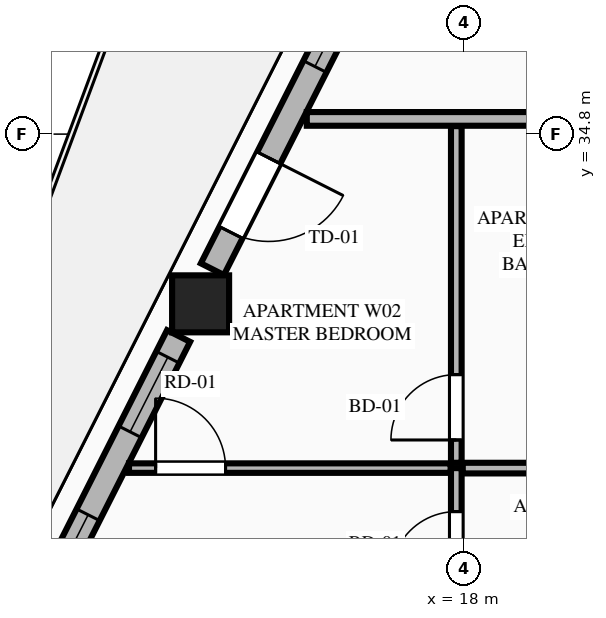
"""IFC4 building model, lengths in metres.
Left out: names, types, materials, properties, quantities, classifications, styles, units other than length and angle.
Written with IfcOpenShell. Run it as: python <this file> out.ifc"""

import sys

from ifc_helpers import new_model, si_unit, direction, frame, frame_2d, origin, origin_2d, place, context, subcontext, project, spatial, rectangle, extrude, element, fill, save


model = new_model("IFC4")
c1 = context("Model", 3, precision=1e-05, world=origin(), true_north=direction((0.0, 1.0)))
c2 = subcontext(c1, "Body", "Model", "MODEL_VIEW")
j1 = project(units=[si_unit("LENGTHUNIT", "METRE"), si_unit("PLANEANGLEUNIT", "RADIAN")], contexts=[c1])
p1 = place(None, origin())
s1 = spatial("IfcSite", under=j1, at=p1, CompositionType="ELEMENT")
p2 = place(p1, origin())
s2 = spatial("IfcBuilding", under=s1, at=p2, CompositionType="ELEMENT")
p3 = place(p2, frame((0.0, 0.0, 256.2)))
s3 = spatial("IfcBuildingStorey", under=s2, at=p3, CompositionType="ELEMENT", Elevation=256.2)
p4 = place(p3, frame((14.536, 32.567, 0.0), z_axis=(0.0, 0.0, 1.0), x_axis=(1.0, 0.0, 0.0)))
e1 = element("IfcColumn", 1, at=p4, inside=s3, PredefinedType="COLUMN", context=c2, shape_type="SweptSolid", body=[
    extrude(rectangle(XDim=0.75, YDim=0.75, at=origin_2d()), origin(), (0.0, 0.0, 1.0), 3.65),
])
p5 = place(p3, frame((16.768, 37.127, 0.0), z_axis=(0.0, 0.0, 1.0), x_axis=(-0.451581819983, -0.892229712496, 0.0)))
e2 = element("IfcWall", 2, at=p5, inside=s3, PredefinedType="STANDARD", context=c2, shape_type="SweptSolid", body=[
    extrude(rectangle(XDim=4.6, YDim=0.34, at=frame_2d((2.3, 0.0))), origin(), (0.0, 0.0, 1.0), 2.983),
])
p6 = place(p5, frame((2.958, 0.0, 0.0)))
e3 = element("IfcOpeningElement", 3, at=p6, cuts=e2, PredefinedType="OPENING", context=c2, shape_type="SweptSolid", body=[
    extrude(rectangle(XDim=1.1, YDim=2.25, at=frame_2d((0.55, 1.125))), frame((0.0, 0.18, 0.0), z_axis=(0.0, -1.0, 0.0), x_axis=(1.0, 0.0, 0.0)), (0.0, 0.0, 1.0), 0.36),
])
p7 = place(p5, frame((0.512, 0.0, 0.75)))
e4 = element("IfcOpeningElement", 4, at=p7, cuts=e2, PredefinedType="OPENING", context=c2, shape_type="SweptSolid", body=[
    extrude(rectangle(XDim=1.1, YDim=2.0, at=frame_2d((0.55, 1.0))), frame((0.0, 0.18, 0.0), z_axis=(0.0, -1.0, 0.0), x_axis=(1.0, 0.0, 0.0)), (0.0, 0.0, 1.0), 0.36),
])
p8 = place(p3, frame((14.246, 32.144, 0.0), z_axis=(0.0, 0.0, 1.0), x_axis=(-0.451285866323, -0.892379441077, 0.0)))
e5 = element("IfcWall", 5, at=p8, inside=s3, PredefinedType="STANDARD", context=c2, shape_type="SweptSolid", body=[
    extrude(rectangle(XDim=4.407, YDim=0.34, at=frame_2d((2.204, 0.0))), origin(), (0.0, 0.0, 1.0), 2.983),
])
p9 = place(p8, frame((0.313, 0.0, 0.75)))
e6 = element("IfcOpeningElement", 6, at=p9, cuts=e5, PredefinedType="OPENING", context=c2, shape_type="SweptSolid", body=[
    extrude(rectangle(XDim=1.1, YDim=2.0, at=frame_2d((0.55, 1.0))), frame((0.0, 0.18, 0.0), z_axis=(0.0, -1.0, 0.0), x_axis=(1.0, 0.0, 0.0)), (0.0, 0.0, 1.0), 0.36),
])
p10 = place(p8, frame((2.636, 0.0, 0.75)))
e7 = element("IfcOpeningElement", 7, at=p10, cuts=e5, PredefinedType="OPENING", context=c2, shape_type="SweptSolid", body=[
    extrude(rectangle(XDim=1.1, YDim=2.0, at=frame_2d((0.55, 1.0))), frame((0.0, 0.18, 0.0), z_axis=(0.0, -1.0, 0.0), x_axis=(1.0, 0.0, 0.0)), (0.0, 0.0, 1.0), 0.36),
])
p11 = place(p3, frame((15.933, 35.0, 0.0), z_axis=(0.0, 0.0, 1.0), x_axis=(1.0, 0.0, 0.0)))
e8 = element("IfcWall", 8, at=p11, inside=s3, PredefinedType="PARTITIONING", context=c2, shape_type="SweptSolid", body=[
    extrude(rectangle(XDim=4.322, YDim=0.18, at=frame_2d((2.161, 0.0))), origin(), (0.0, 0.0, 1.0), 3.45),
])
p12 = place(p3, frame((17.9, 27.006, 0.0), z_axis=(0.0, 0.0, 1.0), x_axis=(0.0, 1.0, 0.0)))
e9 = element("IfcWall", 9, at=p12, inside=s3, PredefinedType="PLUMBINGWALL", context=c2, shape_type="SweptSolid", body=[
    extrude(rectangle(XDim=3.4, YDim=0.14, at=frame_2d((1.7, 0.0))), origin(), (0.0, 0.0, 1.0), 3.45),
])
p13 = place(p12, frame((0.2, 0.0, 0.0)))
e10 = element("IfcOpeningElement", 10, at=p13, cuts=e9, PredefinedType="OPENING", context=c2, shape_type="SweptSolid", body=[
    extrude(rectangle(XDim=0.88, YDim=2.15, at=frame_2d((0.44, 1.075))), frame((0.0, 0.08, 0.0), z_axis=(0.0, -1.0, 0.0), x_axis=(1.0, 0.0, 0.0)), (0.0, 0.0, 1.0), 0.16),
])
p14 = place(p12, frame((1.968, 0.0, 0.0)))
e11 = element("IfcOpeningElement", 11, at=p14, cuts=e9, PredefinedType="OPENING", context=c2, shape_type="SweptSolid", body=[
    extrude(rectangle(XDim=0.86, YDim=2.1, at=frame_2d((0.43, 1.05))), frame((0.0, 0.08, 0.0), z_axis=(0.0, -1.0, 0.0), x_axis=(1.0, 0.0, 0.0)), (0.0, 0.0, 1.0), 0.16),
])
p15 = place(p3, frame((17.9, 30.476, 0.0), z_axis=(0.0, 0.0, 1.0), x_axis=(0.0, 1.0, 0.0)))
e12 = element("IfcWall", 12, at=p15, inside=s3, PredefinedType="PLUMBINGWALL", context=c2, shape_type="SweptSolid", body=[
    extrude(rectangle(XDim=4.429, YDim=0.14, at=frame_2d((2.214, 0.0))), origin(), (0.0, 0.0, 1.0), 3.45),
])
p16 = place(p15, frame((0.3, 0.0, 0.0)))
e13 = element("IfcOpeningElement", 13, at=p16, cuts=e12, PredefinedType="OPENING", context=c2, shape_type="SweptSolid", body=[
    extrude(rectangle(XDim=0.86, YDim=2.1, at=frame_2d((0.43, 1.05))), frame((0.0, 0.08, 0.0), z_axis=(0.0, -1.0, 0.0), x_axis=(1.0, 0.0, 0.0)), (0.0, 0.0, 1.0), 0.16),
])
p17 = place(p3, frame((17.985, 30.406, 0.0), z_axis=(0.0, 0.0, 1.0), x_axis=(1.0, 0.0, 0.0)))
e14 = element("IfcWall", 14, at=p17, inside=s3, PredefinedType="PLUMBINGWALL", context=c2, shape_type="SweptSolid", body=[
    extrude(rectangle(XDim=2.48, YDim=0.14, at=frame_2d((1.24, 0.0))), origin(), (0.0, 0.0, 1.0), 3.45),
])
p18 = place(p3, frame((13.594, 30.406, 0.0), z_axis=(0.0, 0.0, 1.0), x_axis=(1.0, 0.0, 0.0)))
e15 = element("IfcWall", 15, at=p18, inside=s3, PredefinedType="PARTITIONING", context=c2, shape_type="SweptSolid", body=[
    extrude(rectangle(XDim=4.231, YDim=0.125, at=frame_2d((2.115, 0.0))), origin(), (0.0, 0.0, 1.0), 3.45),
])
p19 = place(p18, frame((0.35, 0.0, 0.0)))
e16 = element("IfcOpeningElement", 16, at=p19, cuts=e15, PredefinedType="OPENING", context=c2, shape_type="SweptSolid", body=[
    extrude(rectangle(XDim=0.92, YDim=2.15, at=frame_2d((0.46, 1.075))), frame((0.0, 0.073, 0.0), z_axis=(0.0, -1.0, 0.0), x_axis=(1.0, 0.0, 0.0)), (0.0, 0.0, 1.0), 0.145),
])
p20 = place(p6, origin())
e17 = element("IfcDoor", 17, at=p20, inside=s3, OperationType="SINGLE_SWING_LEFT", PredefinedType="DOOR", context=c2, shape_type="SweptSolid", body=[
    extrude(rectangle(XDim=1.1, YDim=2.25, at=frame_2d((0.55, 1.125))), frame((0.0, 0.025, 0.0), z_axis=(0.0, -1.0, 0.0), x_axis=(1.0, 0.0, 0.0)), (0.0, 0.0, 1.0), 0.05),
])
fill(e3, e17)
p21 = place(p9, origin())
e18 = element("IfcWindow", 18, at=p21, inside=s3, PartitioningType="SINGLE_PANEL", PredefinedType="WINDOW", context=c2, shape_type="SweptSolid", body=[
    extrude(rectangle(XDim=1.1, YDim=2.0, at=frame_2d((0.55, 1.0))), frame((0.0, 0.03, 0.0), z_axis=(0.0, -1.0, 0.0), x_axis=(1.0, 0.0, 0.0)), (0.0, 0.0, 1.0), 0.06),
])
fill(e6, e18)
p22 = place(p14, origin())
e19 = element("IfcDoor", 19, at=p22, inside=s3, OperationType="SINGLE_SWING_LEFT", PredefinedType="DOOR", context=c2, shape_type="SweptSolid", body=[
    extrude(rectangle(XDim=0.86, YDim=2.1, at=frame_2d((0.43, 1.05))), frame((0.0, 0.025, 0.0), z_axis=(0.0, -1.0, 0.0), x_axis=(1.0, 0.0, 0.0)), (0.0, 0.0, 1.0), 0.05),
])
fill(e11, e19)
p23 = place(p16, origin())
e20 = element("IfcDoor", 20, at=p23, inside=s3, OperationType="SINGLE_SWING_LEFT", PredefinedType="DOOR", context=c2, shape_type="SweptSolid", body=[
    extrude(rectangle(XDim=0.86, YDim=2.1, at=frame_2d((0.43, 1.05))), frame((0.0, 0.025, 0.0), z_axis=(0.0, -1.0, 0.0), x_axis=(1.0, 0.0, 0.0)), (0.0, 0.0, 1.0), 0.05),
])
fill(e13, e20)
p24 = place(p19, origin())
e21 = element("IfcDoor", 21, at=p24, inside=s3, OperationType="SINGLE_SWING_LEFT", PredefinedType="DOOR", context=c2, shape_type="SweptSolid", body=[
    extrude(rectangle(XDim=0.92, YDim=2.15, at=frame_2d((0.46, 1.075))), frame((0.0, 0.025, 0.0), z_axis=(0.0, -1.0, 0.0), x_axis=(1.0, 0.0, 0.0)), (0.0, 0.0, 1.0), 0.05),
])
fill(e16, e21)
p25 = place(p7, origin())
e22 = element("IfcWindow", 22, at=p25, inside=s3, PartitioningType="SINGLE_PANEL", PredefinedType="WINDOW", context=c2, shape_type="SweptSolid", body=[
    extrude(rectangle(XDim=1.1, YDim=2.0, at=frame_2d((0.55, 1.0))), frame((0.0, 0.03, 0.0), z_axis=(0.0, -1.0, 0.0), x_axis=(1.0, 0.0, 0.0)), (0.0, 0.0, 1.0), 0.06),
])
fill(e4, e22)
p26 = place(p10, origin())
e23 = element("IfcWindow", 23, at=p26, inside=s3, PartitioningType="SINGLE_PANEL", PredefinedType="WINDOW", context=c2, shape_type="SweptSolid", body=[
    extrude(rectangle(XDim=1.1, YDim=2.0, at=frame_2d((0.55, 1.0))), frame((0.0, 0.03, 0.0), z_axis=(0.0, -1.0, 0.0), x_axis=(1.0, 0.0, 0.0)), (0.0, 0.0, 1.0), 0.06),
])
fill(e7, e23)
save(model, sys.argv[1])
